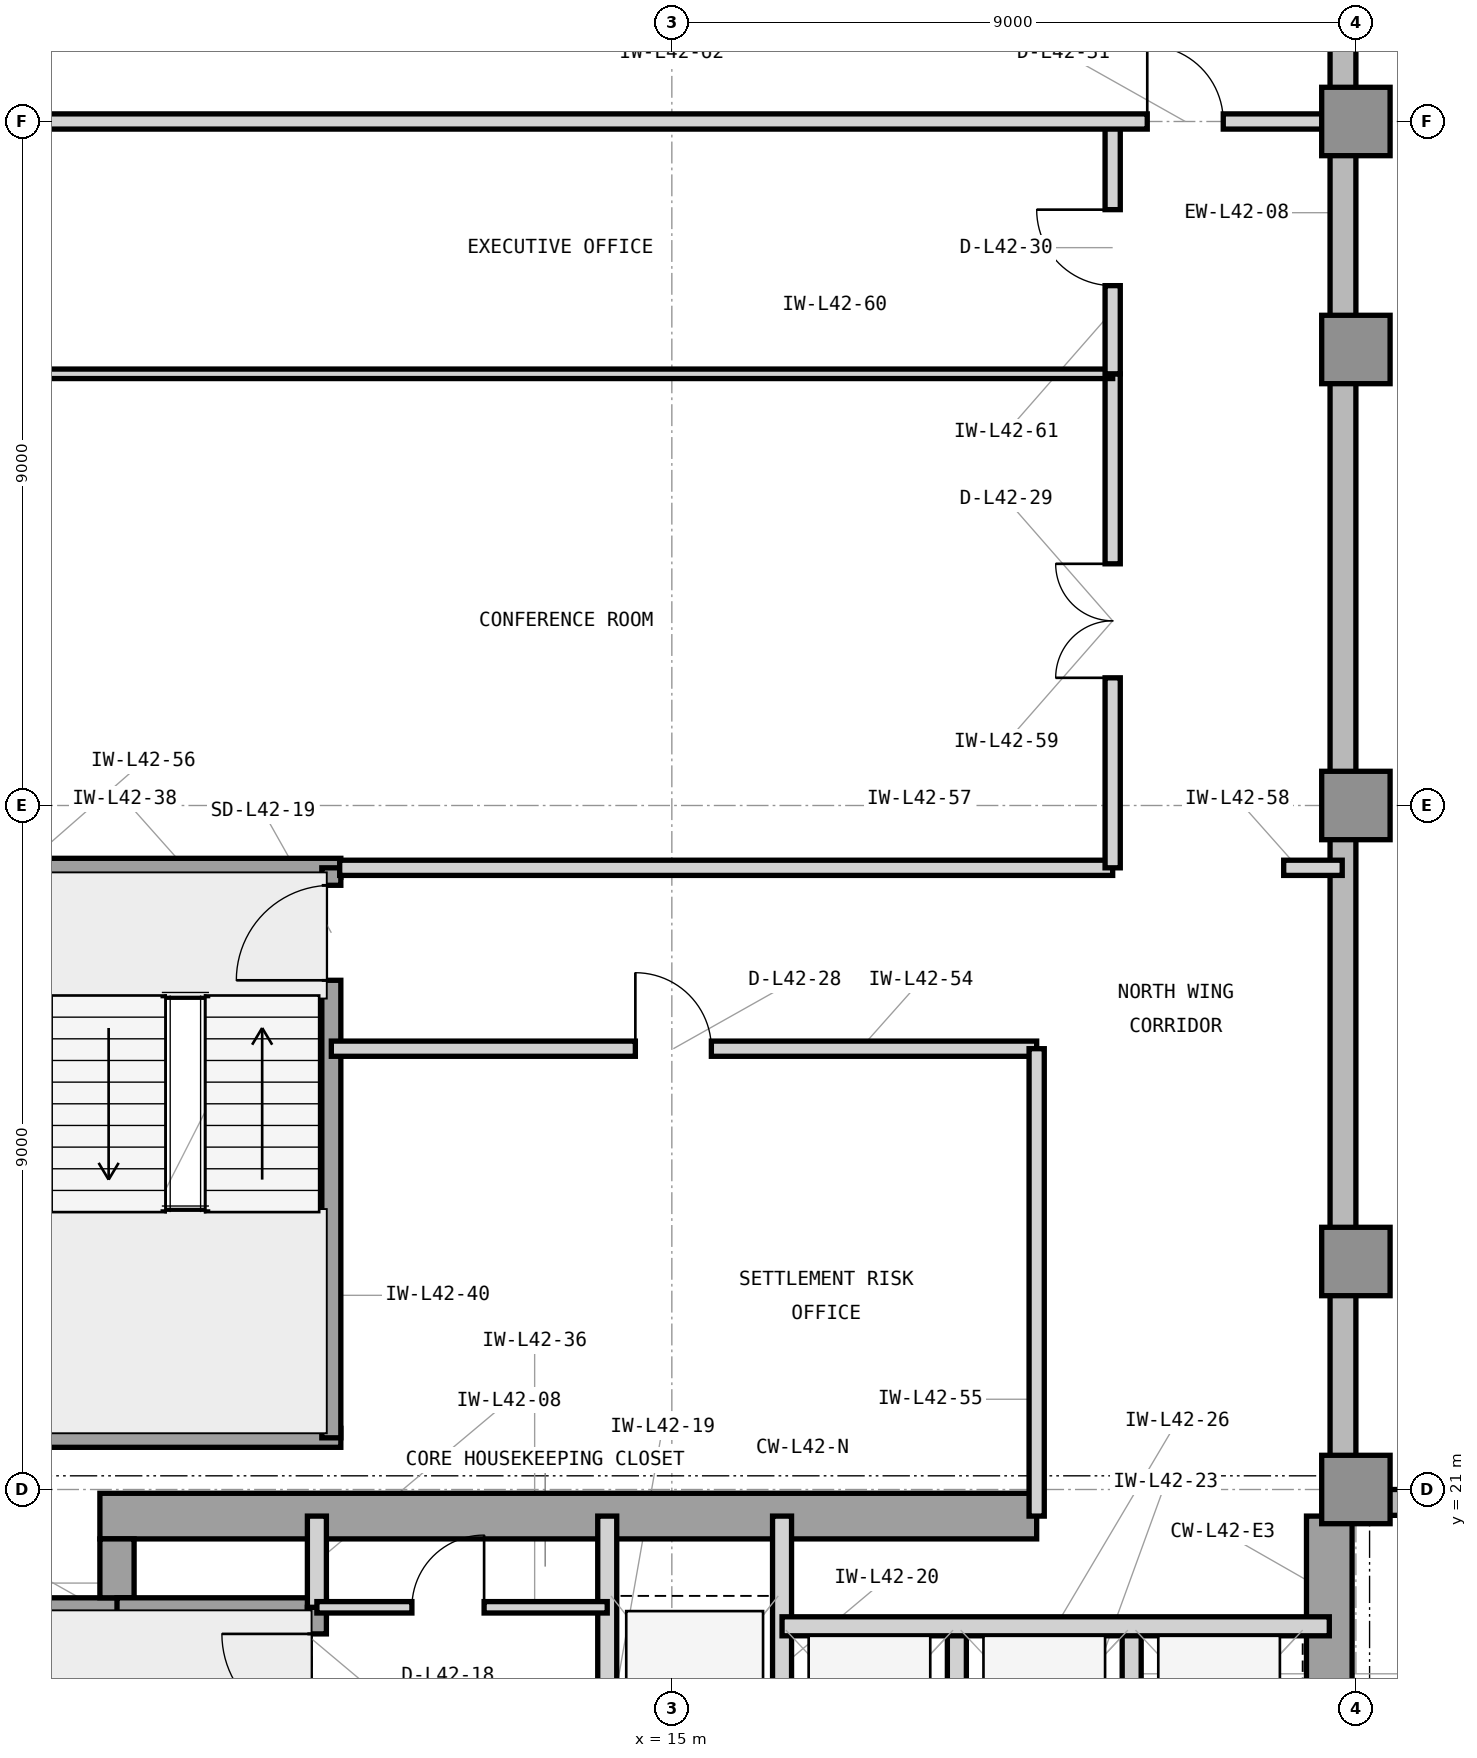
"""IFC4 building model, lengths in metres.
Left out: names, types, materials, properties, quantities, classifications, styles, units other than length and angle.
Written with IfcOpenShell. Run it as: python <this file> out.ifc"""

import sys

from ifc_helpers import new_model, si_unit, direction, frame, frame_2d, origin, origin_2d, place, context, subcontext, project, spatial, rectangle, extrude, element, fill, save


model = new_model("IFC4")
c1 = context("Model", 3, precision=1e-05, world=origin(), true_north=direction((0.0, 1.0)))
c2 = subcontext(c1, "Body", "Model", "MODEL_VIEW")
j1 = project(units=[si_unit("LENGTHUNIT", "METRE"), si_unit("PLANEANGLEUNIT", "RADIAN")], contexts=[c1])
p1 = place(None, origin())
s1 = spatial("IfcSite", under=j1, at=p1, CompositionType="ELEMENT")
p2 = place(p1, origin())
s2 = spatial("IfcBuilding", under=s1, at=p2, CompositionType="ELEMENT")
p3 = place(p2, frame((0.0, 0.0, 176.1)))
s3 = spatial("IfcBuildingStorey", under=s2, at=p3, CompositionType="ELEMENT", Elevation=176.1)
p4 = place(p3, frame((7.475, 20.65, 0.0), z_axis=(0.0, 0.0, 1.0), x_axis=(1.0, 0.0, 0.0)))
e1 = element("IfcWall", 1, at=p4, inside=s3, PredefinedType="SHEAR", context=c2, shape_type="SweptSolid", body=[
    extrude(rectangle(XDim=12.325, YDim=0.6, at=frame_2d((6.163, 0.0))), origin(), (0.0, 0.0, 1.0), 3.9),
])
p5 = place(p3, frame((23.65, 16.6, 0.0), z_axis=(0.0, 0.0, 1.0), x_axis=(0.0, 1.0, 0.0)))
e2 = element("IfcWall", 2, at=p5, inside=s3, PredefinedType="SHEAR", context=c2, shape_type="SweptSolid", body=[
    extrude(rectangle(XDim=4.05, YDim=0.6, at=frame_2d((2.025, 0.0))), origin(), (0.0, 0.0, 1.0), 3.9),
])
p6 = place(p3, frame((6.65, 19.35, 0.0), z_axis=(0.0, 0.0, 1.0), x_axis=(1.0, 0.0, 0.0)))
e3 = element("IfcWall", 3, at=p6, inside=s3, PredefinedType="SHEAR", context=c2, shape_type="SweptSolid", body=[
    extrude(rectangle(XDim=1.275, YDim=0.45, at=frame_2d((0.638, 0.0))), origin(), (0.0, 0.0, 1.0), 3.9),
])
p7 = place(p3, frame((7.7, 19.575, 0.0), z_axis=(0.0, 0.0, 1.0), x_axis=(0.0, 1.0, 0.0)))
e4 = element("IfcWall", 4, at=p7, inside=s3, PredefinedType="SHEAR", context=c2, shape_type="SweptSolid", body=[
    extrude(rectangle(XDim=0.775, YDim=0.45, at=frame_2d((0.388, 0.0))), origin(), (0.0, 0.0, 1.0), 3.9),
])
for number, where, z_axis, x_axis in (
    (5, (24.0, 21.0, 0.0), (0.0, 0.0, 1.0), (1.0, 0.0, 0.0)),
    (6, (24.0, 24.0, 0.0), (0.0, 0.0, 1.0), (1.0, 0.0, 0.0)),
    (7, (24.0, 30.0, 0.0), (0.0, 0.0, 1.0), (1.0, 0.0, 0.0)),
    (8, (24.0, 36.0, 0.0), (0.0, 0.0, 1.0), (1.0, 0.0, 0.0)),
    (9, (24.0, 39.0, 0.0), (0.0, 0.0, 1.0), (1.0, 0.0, 0.0)),
):
    element("IfcColumn", number, at=place(p3, frame(where, z_axis=z_axis, x_axis=x_axis)), inside=s3, PredefinedType="COLUMN", context=c2, shape_type="SweptSolid", body=[
        extrude(rectangle(XDim=0.9, YDim=0.9, at=origin_2d()), origin(), (0.0, 0.0, 1.0), 3.9),
    ])
p8 = place(p3, frame((55.4, 20.83, 0.0), z_axis=(0.0, 0.0, 1.0), x_axis=(-1.0, 0.0, 0.0)))
e10 = element("IfcWall", 10, at=p8, inside=s3, PredefinedType="STANDARD", context=c2, shape_type="SweptSolid", body=[
    extrude(rectangle(XDim=31.4, YDim=0.34, at=frame_2d((15.7, 0.0))), origin(), (0.0, 0.0, 1.0), 3.7),
])
p9 = place(p8, frame((17.167, 0.0, 0.9)))
e11 = element("IfcOpeningElement", 11, at=p9, cuts=e10, PredefinedType="OPENING", context=c2, shape_type="SweptSolid", body=[
    extrude(rectangle(XDim=2.3, YDim=2.2, at=frame_2d((1.15, 1.1))), frame((0.0, 0.18, 0.0), z_axis=(0.0, -1.0, 0.0), x_axis=(1.0, 0.0, 0.0)), (0.0, 0.0, 1.0), 0.36),
])
p10 = place(p8, frame((29.046, 0.0, 0.9)))
e12 = element("IfcOpeningElement", 12, at=p10, cuts=e10, PredefinedType="OPENING", context=c2, shape_type="SweptSolid", body=[
    extrude(rectangle(XDim=1.6, YDim=2.2, at=frame_2d((0.8, 1.1))), frame((0.0, 0.18, 0.0), z_axis=(0.0, -1.0, 0.0), x_axis=(1.0, 0.0, 0.0)), (0.0, 0.0, 1.0), 0.36),
])
p11 = place(p8, frame((8.675, 0.0, 0.9)))
e13 = element("IfcOpeningElement", 13, at=p11, cuts=e10, PredefinedType="OPENING", context=c2, shape_type="SweptSolid", body=[
    extrude(rectangle(XDim=2.3, YDim=2.2, at=frame_2d((1.15, 1.1))), frame((0.0, 0.18, 0.0), z_axis=(0.0, -1.0, 0.0), x_axis=(1.0, 0.0, 0.0)), (0.0, 0.0, 1.0), 0.36),
])
p12 = place(p3, frame((23.83, 21.0, 0.0), z_axis=(0.0, 0.0, 1.0), x_axis=(0.0, 1.0, 0.0)))
e14 = element("IfcWall", 14, at=p12, inside=s3, PredefinedType="STANDARD", context=c2, shape_type="SweptSolid", body=[
    extrude(rectangle(XDim=22.4, YDim=0.34, at=frame_2d((11.2, 0.0))), origin(), (0.0, 0.0, 1.0), 3.7),
])
p13 = place(p3, frame((7.7, 19.45, 0.0), z_axis=(0.0, 0.0, 1.0), x_axis=(1.0, 0.0, 0.0)))
e15 = element("IfcWall", 15, at=p13, inside=s3, PredefinedType="SHEAR", context=c2, shape_type="SweptSolid", body=[
    extrude(rectangle(XDim=2.755, YDim=0.25, at=frame_2d((1.377, 0.0))), origin(), (0.0, 0.0, 1.0), 3.9),
])
p14 = place(p3, frame((10.33, 12.0, 0.0), z_axis=(0.0, 0.0, 1.0), x_axis=(0.0, 1.0, 0.0)))
e16 = element("IfcWall", 16, at=p14, inside=s3, PredefinedType="SHEAR", context=c2, shape_type="SweptSolid", body=[
    extrude(rectangle(XDim=7.45, YDim=0.25, at=frame_2d((3.725, 0.0))), origin(), (0.0, 0.0, 1.0), 3.9),
])
p15 = place(p14, frame((5.85, 0.0, 0.0)))
e17 = element("IfcOpeningElement", 17, at=p15, cuts=e16, PredefinedType="OPENING", context=c2, shape_type="SweptSolid", body=[
    extrude(rectangle(XDim=1.25, YDim=2.2, at=frame_2d((0.625, 1.1))), frame((0.0, 0.135, 0.0), z_axis=(0.0, -1.0, 0.0), x_axis=(1.0, 0.0, 0.0)), (0.0, 0.0, 1.0), 0.27),
])
p16 = place(p3, frame((10.33, 19.45, 0.0), z_axis=(0.0, 0.0, 1.0), x_axis=(0.0, 1.0, 0.0)))
e18 = element("IfcWall", 18, at=p16, inside=s3, PredefinedType="PARTITIONING", context=c2, shape_type="SweptSolid", body=[
    extrude(rectangle(XDim=1.2, YDim=0.25, at=frame_2d((0.6, 0.0))), origin(), (0.0, 0.0, 1.0), 3.073),
])
for number, where, z_axis, x_axis in (
    (19, (14.15, 16.7, 0.0), (0.0, 0.0, 1.0), (0.0, 1.0, 0.0)),
    (20, (16.45, 16.7, 0.0), (0.0, 0.0, 1.0), (0.0, 1.0, 0.0)),
):
    element("IfcWall", number, at=place(p3, frame(where, z_axis=z_axis, x_axis=x_axis)), inside=s3, PredefinedType="PARTITIONING", context=c2, shape_type="SweptSolid", body=[
        extrude(rectangle(XDim=3.95, YDim=0.25, at=frame_2d((1.975, 0.0))), origin(), (0.0, 0.0, 1.0), 3.69),
    ])
for number, where, z_axis, x_axis in (
    (21, (18.75, 16.7, 0.0), (0.0, 0.0, 1.0), (0.0, 1.0, 0.0)),
    (22, (21.05, 16.7, 0.0), (0.0, 0.0, 1.0), (0.0, 1.0, 0.0)),
):
    element("IfcWall", number, at=place(p3, frame(where, z_axis=z_axis, x_axis=x_axis)), inside=s3, PredefinedType="PARTITIONING", context=c2, shape_type="SweptSolid", body=[
        extrude(rectangle(XDim=2.5, YDim=0.25, at=frame_2d((1.25, 0.0))), origin(), (0.0, 0.0, 1.0), 3.69),
    ])
p17 = place(p3, frame((16.45, 19.2, 0.0), z_axis=(0.0, 0.0, 1.0), x_axis=(1.0, 0.0, 0.0)))
e23 = element("IfcWall", 23, at=p17, inside=s3, PredefinedType="PARTITIONING", context=c2, shape_type="SweptSolid", body=[
    extrude(rectangle(XDim=7.2, YDim=0.25, at=frame_2d((3.6, 0.0))), origin(), (0.0, 0.0, 1.0), 3.69),
])
p18 = place(p3, frame((10.33, 19.45, 0.0), z_axis=(0.0, 0.0, 1.0), x_axis=(1.0, 0.0, 0.0)))
e24 = element("IfcWall", 24, at=p18, inside=s3, PredefinedType="PARTITIONING", context=c2, shape_type="SweptSolid", body=[
    extrude(rectangle(XDim=3.82, YDim=0.15, at=frame_2d((1.91, 0.0))), origin(), (0.0, 0.0, 1.0), 3.69),
])
p19 = place(p18, frame((1.25, 0.0, 0.0)))
e25 = element("IfcOpeningElement", 25, at=p19, cuts=e24, PredefinedType="OPENING", context=c2, shape_type="SweptSolid", body=[
    extrude(rectangle(XDim=0.95, YDim=2.1, at=frame_2d((0.475, 1.05))), frame((0.0, 0.085, 0.0), z_axis=(0.0, -1.0, 0.0), x_axis=(1.0, 0.0, 0.0)), (0.0, 0.0, 1.0), 0.17),
])
for number, where, z_axis, x_axis in (
    (26, (6.555, 21.68, 0.0), (0.0, 0.0, 1.0), (1.0, 0.0, 0.0)),
    (27, (6.555, 29.18, 0.0), (0.0, 0.0, 1.0), (1.0, 0.0, 0.0)),
):
    element("IfcWall", number, at=place(p3, frame(where, z_axis=z_axis, x_axis=x_axis)), inside=s3, PredefinedType="SHEAR", context=c2, shape_type="SweptSolid", body=[
        extrude(rectangle(XDim=4.09, YDim=0.25, at=frame_2d((2.045, 0.0))), origin(), (0.0, 0.0, 1.0), 3.9),
    ])
p20 = place(p3, frame((10.52, 21.68, 0.0), z_axis=(0.0, 0.0, 1.0), x_axis=(0.0, 1.0, 0.0)))
e28 = element("IfcWall", 28, at=p20, inside=s3, PredefinedType="SHEAR", context=c2, shape_type="SweptSolid", body=[
    extrude(rectangle(XDim=7.5, YDim=0.25, at=frame_2d((3.75, 0.0))), origin(), (0.0, 0.0, 1.0), 3.9),
])
p21 = place(p20, frame((6.02, 0.0, 0.0)))
e29 = element("IfcOpeningElement", 29, at=p21, cuts=e28, PredefinedType="OPENING", context=c2, shape_type="SweptSolid", body=[
    extrude(rectangle(XDim=1.25, YDim=2.2, at=frame_2d((0.625, 1.1))), frame((0.0, 0.135, 0.0), z_axis=(0.0, -1.0, 0.0), x_axis=(1.0, 0.0, 0.0)), (0.0, 0.0, 1.0), 0.27),
])
p22 = place(p3, frame((10.52, 26.8, 0.0), z_axis=(0.0, 0.0, 1.0), x_axis=(1.0, 0.0, 0.0)))
e30 = element("IfcWall", 30, at=p22, inside=s3, PredefinedType="PARTITIONING", context=c2, shape_type="SweptSolid", body=[
    extrude(rectangle(XDim=9.28, YDim=0.2, at=frame_2d((4.64, 0.0))), origin(), (0.0, 0.0, 1.0), 3.69),
])
p23 = place(p22, frame((4.0, 0.0, 0.0)))
e31 = element("IfcOpeningElement", 31, at=p23, cuts=e30, PredefinedType="OPENING", context=c2, shape_type="SweptSolid", body=[
    extrude(rectangle(XDim=1.0, YDim=2.15, at=frame_2d((0.5, 1.075))), frame((0.0, 0.11, 0.0), z_axis=(0.0, -1.0, 0.0), x_axis=(1.0, 0.0, 0.0)), (0.0, 0.0, 1.0), 0.22),
])
p24 = place(p3, frame((19.8, 20.65, 0.0), z_axis=(0.0, 0.0, 1.0), x_axis=(0.0, 1.0, 0.0)))
e32 = element("IfcWall", 32, at=p24, inside=s3, PredefinedType="PARTITIONING", context=c2, shape_type="SweptSolid", body=[
    extrude(rectangle(XDim=6.15, YDim=0.2, at=frame_2d((3.075, 0.0))), origin(), (0.0, 0.0, 1.0), 3.69),
])
p25 = place(p3, frame((10.63, 29.18, 0.0), z_axis=(0.0, 0.0, 1.0), x_axis=(1.0, 0.0, 0.0)))
e33 = element("IfcWall", 33, at=p25, inside=s3, PredefinedType="PARTITIONING", context=c2, shape_type="SweptSolid", body=[
    extrude(rectangle(XDim=10.17, YDim=0.2, at=frame_2d((5.085, 0.0))), origin(), (0.0, 0.0, 1.0), 3.69),
])
p26 = place(p3, frame((23.05, 29.18, 0.0), z_axis=(0.0, 0.0, 1.0), x_axis=(1.0, 0.0, 0.0)))
e34 = element("IfcWall", 34, at=p26, inside=s3, PredefinedType="PARTITIONING", context=c2, shape_type="SweptSolid", body=[
    extrude(rectangle(XDim=0.77, YDim=0.2, at=frame_2d((0.385, 0.0))), origin(), (0.0, 0.0, 1.0), 3.69),
])
p27 = place(p3, frame((20.8, 29.18, 0.0), z_axis=(0.0, 0.0, 1.0), x_axis=(0.0, 1.0, 0.0)))
e35 = element("IfcWall", 35, at=p27, inside=s3, PredefinedType="PARTITIONING", context=c2, shape_type="SweptSolid", body=[
    extrude(rectangle(XDim=6.5, YDim=0.2, at=frame_2d((3.25, 0.0))), origin(), (0.0, 0.0, 1.0), 3.69),
])
p28 = place(p27, frame((2.5, 0.0, 0.0)))
e36 = element("IfcOpeningElement", 36, at=p28, cuts=e35, PredefinedType="OPENING", context=c2, shape_type="SweptSolid", body=[
    extrude(rectangle(XDim=1.5, YDim=2.3, at=frame_2d((0.75, 1.15))), frame((0.0, 0.11, 0.0), z_axis=(0.0, -1.0, 0.0), x_axis=(1.0, 0.0, 0.0)), (0.0, 0.0, 1.0), 0.22),
])
p29 = place(p3, frame((6.18, 35.68, 0.0), z_axis=(0.0, 0.0, 1.0), x_axis=(1.0, 0.0, 0.0)))
e37 = element("IfcWall", 37, at=p29, inside=s3, PredefinedType="PARTITIONING", context=c2, shape_type="SweptSolid", body=[
    extrude(rectangle(XDim=14.62, YDim=0.125, at=frame_2d((7.31, 0.0))), origin(), (0.0, 0.0, 1.0), 3.69),
])
p30 = place(p3, frame((20.8, 35.68, 0.0), z_axis=(0.0, 0.0, 1.0), x_axis=(0.0, 1.0, 0.0)))
e38 = element("IfcWall", 38, at=p30, inside=s3, PredefinedType="PARTITIONING", context=c2, shape_type="SweptSolid", body=[
    extrude(rectangle(XDim=3.32, YDim=0.2, at=frame_2d((1.66, 0.0))), origin(), (0.0, 0.0, 1.0), 3.69),
])
p31 = place(p30, frame((1.16, 0.0, 0.0)))
e39 = element("IfcOpeningElement", 39, at=p31, cuts=e38, PredefinedType="OPENING", context=c2, shape_type="SweptSolid", body=[
    extrude(rectangle(XDim=1.0, YDim=2.15, at=frame_2d((0.5, 1.075))), frame((0.0, 0.11, 0.0), z_axis=(0.0, -1.0, 0.0), x_axis=(1.0, 0.0, 0.0)), (0.0, 0.0, 1.0), 0.22),
])
p32 = place(p3, frame((6.18, 39.0, 0.0), z_axis=(0.0, 0.0, 1.0), x_axis=(1.0, 0.0, 0.0)))
e40 = element("IfcWall", 40, at=p32, inside=s3, PredefinedType="PARTITIONING", context=c2, shape_type="SweptSolid", body=[
    extrude(rectangle(XDim=17.64, YDim=0.2, at=frame_2d((8.82, 0.0))), origin(), (0.0, 0.0, 1.0), 3.073),
])
p33 = place(p32, frame((15.075, 0.0, 0.0)))
e41 = element("IfcOpeningElement", 41, at=p33, cuts=e40, PredefinedType="OPENING", context=c2, shape_type="SweptSolid", body=[
    extrude(rectangle(XDim=1.0, YDim=2.15, at=frame_2d((0.5, 1.075))), frame((0.0, 0.11, 0.0), z_axis=(0.0, -1.0, 0.0), x_axis=(1.0, 0.0, 0.0)), (0.0, 0.0, 1.0), 0.22),
])
p34 = place(p15, origin())
e42 = element("IfcDoor", 42, at=p34, inside=s3, OperationType="SINGLE_SWING_RIGHT", PredefinedType="DOOR", context=c2, shape_type="SweptSolid", body=[
    extrude(rectangle(XDim=1.25, YDim=2.2, at=frame_2d((0.625, 1.1))), frame((0.0, 0.025, 0.0), z_axis=(0.0, -1.0, 0.0), x_axis=(1.0, 0.0, 0.0)), (0.0, 0.0, 1.0), 0.05),
])
fill(e17, e42)
p35 = place(p19, origin())
e43 = element("IfcDoor", 43, at=p35, inside=s3, OperationType="SINGLE_SWING_RIGHT", PredefinedType="DOOR", context=c2, shape_type="SweptSolid", body=[
    extrude(rectangle(XDim=0.95, YDim=2.1, at=frame_2d((0.475, 1.05))), frame((0.0, 0.025, 0.0), z_axis=(0.0, -1.0, 0.0), x_axis=(1.0, 0.0, 0.0)), (0.0, 0.0, 1.0), 0.05),
])
fill(e25, e43)
p36 = place(p21, origin())
e44 = element("IfcDoor", 44, at=p36, inside=s3, OperationType="SINGLE_SWING_LEFT", PredefinedType="DOOR", context=c2, shape_type="SweptSolid", body=[
    extrude(rectangle(XDim=1.25, YDim=2.2, at=frame_2d((0.625, 1.1))), frame((0.0, 0.025, 0.0), z_axis=(0.0, -1.0, 0.0), x_axis=(1.0, 0.0, 0.0)), (0.0, 0.0, 1.0), 0.05),
])
fill(e29, e44)
p37 = place(p23, origin())
e45 = element("IfcDoor", 45, at=p37, inside=s3, OperationType="SINGLE_SWING_LEFT", PredefinedType="DOOR", context=c2, shape_type="SweptSolid", body=[
    extrude(rectangle(XDim=1.0, YDim=2.15, at=frame_2d((0.5, 1.075))), frame((0.0, 0.025, 0.0), z_axis=(0.0, -1.0, 0.0), x_axis=(1.0, 0.0, 0.0)), (0.0, 0.0, 1.0), 0.05),
])
fill(e31, e45)
p38 = place(p28, origin())
e46 = element("IfcDoor", 46, at=p38, inside=s3, OperationType="DOUBLE_DOOR_SINGLE_SWING", PredefinedType="DOOR", context=c2, shape_type="SweptSolid", body=[
    extrude(rectangle(XDim=1.5, YDim=2.3, at=frame_2d((0.75, 1.15))), frame((0.0, 0.025, 0.0), z_axis=(0.0, -1.0, 0.0), x_axis=(1.0, 0.0, 0.0)), (0.0, 0.0, 1.0), 0.05),
])
fill(e36, e46)
p39 = place(p31, origin())
e47 = element("IfcDoor", 47, at=p39, inside=s3, OperationType="SINGLE_SWING_RIGHT", PredefinedType="DOOR", context=c2, shape_type="SweptSolid", body=[
    extrude(rectangle(XDim=1.0, YDim=2.15, at=frame_2d((0.5, 1.075))), frame((0.0, 0.025, 0.0), z_axis=(0.0, -1.0, 0.0), x_axis=(1.0, 0.0, 0.0)), (0.0, 0.0, 1.0), 0.05),
])
fill(e39, e47)
p40 = place(p33, origin())
e48 = element("IfcDoor", 48, at=p40, inside=s3, OperationType="SINGLE_SWING_LEFT", PredefinedType="DOOR", context=c2, shape_type="SweptSolid", body=[
    extrude(rectangle(XDim=1.0, YDim=2.15, at=frame_2d((0.5, 1.075))), frame((0.0, 0.025, 0.0), z_axis=(0.0, -1.0, 0.0), x_axis=(1.0, 0.0, 0.0)), (0.0, 0.0, 1.0), 0.05),
])
fill(e41, e48)
save(model, sys.argv[1])
